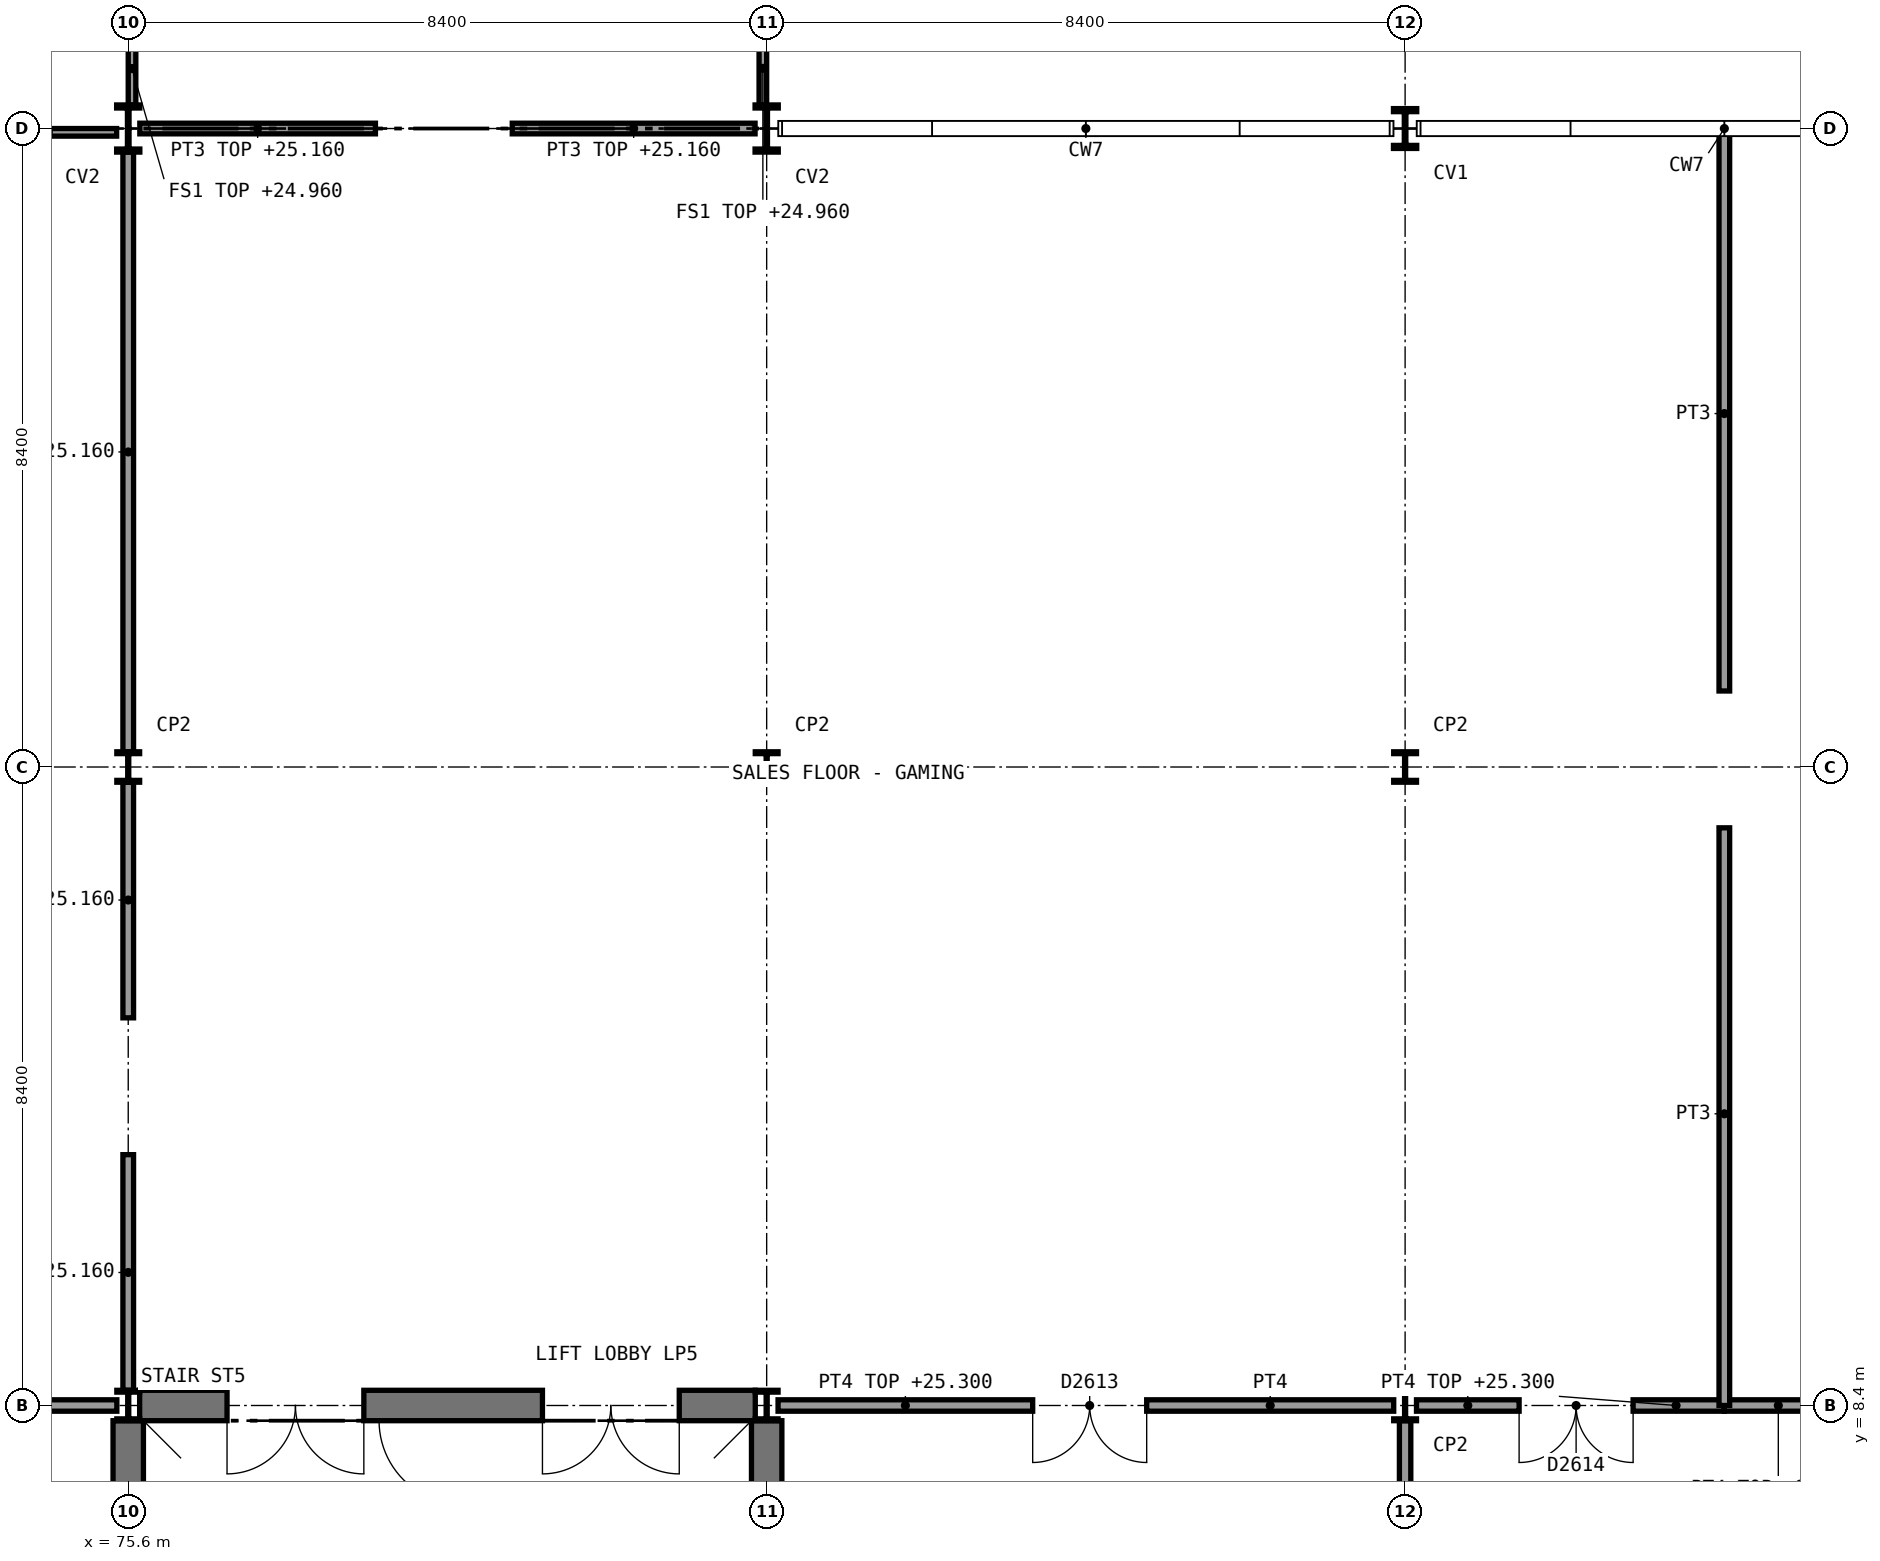
"""IFC4 building model, lengths in metres.
Left out: names, types, materials, properties, quantities, classifications, styles, units other than length and angle.
Written with IfcOpenShell. Run it as: python <this file> out.ifc"""

import sys

from ifc_helpers import new_model, si_unit, direction, frame, frame_2d, origin, origin_2d, place, context, subcontext, project, spatial, rectangle, i_section, extrude, element, fill, save


model = new_model("IFC4")
c1 = context("Model", 3, precision=1e-05, world=origin(), true_north=direction((0.0, 1.0)))
c2 = subcontext(c1, "Body", "Model", "MODEL_VIEW")
j1 = project(units=[si_unit("LENGTHUNIT", "METRE"), si_unit("PLANEANGLEUNIT", "RADIAN")], contexts=[c1])
p1 = place(None, origin())
s1 = spatial("IfcSite", under=j1, at=p1, CompositionType="ELEMENT")
p2 = place(p1, origin())
s2 = spatial("IfcBuilding", under=s1, at=p2, CompositionType="ELEMENT")
p3 = place(p2, frame((0.0, 0.0, 21.0)))
s3 = spatial("IfcBuildingStorey", under=s2, at=p3, CompositionType="ELEMENT", Elevation=21.0)
p4 = place(p3, frame((75.75, 8.4, 0.0), z_axis=(0.0, 0.0, 1.0), x_axis=(1.0, 0.0, 0.0)))
e1 = element("IfcWall", 1, at=p4, inside=s3, PredefinedType="SHEAR", context=c2, shape_type="SweptSolid", body=[
    extrude(rectangle(XDim=8.1, YDim=0.4, at=frame_2d((4.05, 0.0))), origin(), (0.0, 0.0, 1.0), 4.65),
])
p5 = place(p4, frame((1.15, 0.0, 0.0)))
e2 = element("IfcOpeningElement", 2, at=p5, cuts=e1, PredefinedType="OPENING", context=c2, shape_type="SweptSolid", body=[
    extrude(rectangle(XDim=1.8, YDim=2.1, at=frame_2d((0.9, 1.05))), frame((0.0, 0.21, 0.0), z_axis=(0.0, -1.0, 0.0), x_axis=(1.0, 0.0, 0.0)), (0.0, 0.0, 1.0), 0.42),
])
p6 = place(p4, frame((5.3, 0.0, 0.0)))
e3 = element("IfcOpeningElement", 3, at=p6, cuts=e1, PredefinedType="OPENING", context=c2, shape_type="SweptSolid", body=[
    extrude(rectangle(XDim=1.8, YDim=2.1, at=frame_2d((0.9, 1.05))), frame((0.0, 0.21, 0.0), z_axis=(0.0, -1.0, 0.0), x_axis=(1.0, 0.0, 0.0)), (0.0, 0.0, 1.0), 0.42),
])
for number, where, z_axis, x_axis in (
    (4, (75.6, 0.2, 0.0), (0.0, 0.0, 1.0), (0.0, 1.0, 0.0)),
    (5, (84.0, 0.2, 0.0), (0.0, 0.0, 1.0), (0.0, 1.0, 0.0)),
):
    element("IfcWall", number, at=place(p3, frame(where, z_axis=z_axis, x_axis=x_axis)), inside=s3, PredefinedType="SHEAR", context=c2, shape_type="SweptSolid", body=[
        extrude(rectangle(XDim=8.0, YDim=0.4, at=frame_2d((4.0, 0.0))), origin(), (0.0, 0.0, 1.0), 4.65),
    ])
for number, where, z_axis, x_axis in (
    (6, (75.6, 8.4, 0.0), (0.0, 0.0, 1.0), (1.0, 0.0, 0.0)),
    (7, (75.6, 16.8, 0.0), (0.0, 0.0, 1.0), (1.0, 0.0, 0.0)),
):
    element("IfcColumn", number, at=place(p3, frame(where, z_axis=z_axis, x_axis=x_axis)), inside=s3, PredefinedType="COLUMN", context=c2, shape_type="SweptSolid", body=[
        extrude(i_section(OverallWidth=0.3, OverallDepth=0.4, WebThickness=0.013, FlangeThickness=0.024, FilletRadius=0.027, at=origin_2d()), origin(), (0.0, 0.0, 1.0), 4.8),
    ])
p7 = place(p3, frame((75.6, 25.2, 0.0), z_axis=(0.0, 0.0, 1.0), x_axis=(1.0, 0.0, 0.0)))
e8 = element("IfcColumn", 8, at=p7, inside=s3, PredefinedType="COLUMN", context=c2, shape_type="SweptSolid", body=[
    extrude(i_section(OverallWidth=0.305, OverallDepth=0.62, WebThickness=0.021, FlangeThickness=0.04, FilletRadius=0.027, at=origin_2d()), origin(), (0.0, 0.0, 1.0), 4.8),
])
for number, where, z_axis, x_axis in (
    (9, (84.0, 8.4, 0.0), (0.0, 0.0, 1.0), (1.0, 0.0, 0.0)),
    (10, (84.0, 16.8, 0.0), (0.0, 0.0, 1.0), (1.0, 0.0, 0.0)),
):
    element("IfcColumn", number, at=place(p3, frame(where, z_axis=z_axis, x_axis=x_axis)), inside=s3, PredefinedType="COLUMN", context=c2, shape_type="SweptSolid", body=[
        extrude(i_section(OverallWidth=0.3, OverallDepth=0.4, WebThickness=0.013, FlangeThickness=0.024, FilletRadius=0.027, at=origin_2d()), origin(), (0.0, 0.0, 1.0), 4.8),
    ])
p8 = place(p3, frame((84.0, 25.2, 0.0), z_axis=(0.0, 0.0, 1.0), x_axis=(1.0, 0.0, 0.0)))
e11 = element("IfcColumn", 11, at=p8, inside=s3, PredefinedType="COLUMN", context=c2, shape_type="SweptSolid", body=[
    extrude(i_section(OverallWidth=0.305, OverallDepth=0.62, WebThickness=0.021, FlangeThickness=0.04, FilletRadius=0.027, at=origin_2d()), origin(), (0.0, 0.0, 1.0), 4.8),
])
for number, where, z_axis, x_axis in (
    (12, (92.4, 8.4, 0.0), (0.0, 0.0, 1.0), (1.0, 0.0, 0.0)),
    (13, (92.4, 16.8, 0.0), (0.0, 0.0, 1.0), (1.0, 0.0, 0.0)),
):
    element("IfcColumn", number, at=place(p3, frame(where, z_axis=z_axis, x_axis=x_axis)), inside=s3, PredefinedType="COLUMN", context=c2, shape_type="SweptSolid", body=[
        extrude(i_section(OverallWidth=0.3, OverallDepth=0.4, WebThickness=0.013, FlangeThickness=0.024, FilletRadius=0.027, at=origin_2d()), origin(), (0.0, 0.0, 1.0), 4.8),
    ])
p9 = place(p3, frame((92.4, 25.2, 0.0), z_axis=(0.0, 0.0, 1.0), x_axis=(1.0, 0.0, 0.0)))
e14 = element("IfcColumn", 14, at=p9, inside=s3, PredefinedType="COLUMN", context=c2, shape_type="SweptSolid", body=[
    extrude(i_section(OverallWidth=0.306, OverallDepth=0.524, WebThickness=0.021, FlangeThickness=0.04, FilletRadius=0.027, at=origin_2d()), origin(), (0.0, 0.0, 1.0), 4.8),
])
p10 = place(p3, frame((67.35, 8.4, 0.0), z_axis=(0.0, 0.0, 1.0), x_axis=(1.0, 0.0, 0.0)))
e15 = element("IfcWall", 15, at=p10, inside=s3, PredefinedType="SOLIDWALL", context=c2, shape_type="SweptSolid", body=[
    extrude(rectangle(XDim=8.1, YDim=0.15, at=frame_2d((4.05, 0.0))), origin(), (0.0, 0.0, 1.0), 4.3),
])
p11 = place(p10, frame((3.35, 0.0, 0.0)))
e16 = element("IfcOpeningElement", 16, at=p11, cuts=e15, PredefinedType="OPENING", context=c2, shape_type="SweptSolid", body=[
    extrude(rectangle(XDim=1.5, YDim=2.1, at=frame_2d((0.75, 1.05))), frame((0.0, 0.085, 0.0), z_axis=(0.0, -1.0, 0.0), x_axis=(1.0, 0.0, 0.0)), (0.0, 0.0, 1.0), 0.17),
])
p12 = place(p3, frame((92.4, 0.2, 0.0), z_axis=(0.0, 0.0, 1.0), x_axis=(0.0, 1.0, 0.0)))
e17 = element("IfcWall", 17, at=p12, inside=s3, PredefinedType="SOLIDWALL", context=c2, shape_type="SweptSolid", body=[
    extrude(rectangle(XDim=8.0, YDim=0.15, at=frame_2d((4.0, 0.0))), origin(), (0.0, 0.0, 1.0), 4.16),
])
p13 = place(p3, frame((84.15, 8.4, 0.0), z_axis=(0.0, 0.0, 1.0), x_axis=(1.0, 0.0, 0.0)))
e18 = element("IfcWall", 18, at=p13, inside=s3, PredefinedType="SOLIDWALL", context=c2, shape_type="SweptSolid", body=[
    extrude(rectangle(XDim=8.1, YDim=0.15, at=frame_2d((4.05, 0.0))), origin(), (0.0, 0.0, 1.0), 4.3),
])
p14 = place(p13, frame((3.35, 0.0, 0.0)))
e19 = element("IfcOpeningElement", 19, at=p14, cuts=e18, PredefinedType="OPENING", context=c2, shape_type="SweptSolid", body=[
    extrude(rectangle(XDim=1.5, YDim=2.1, at=frame_2d((0.75, 1.05))), frame((0.0, 0.085, 0.0), z_axis=(0.0, -1.0, 0.0), x_axis=(1.0, 0.0, 0.0)), (0.0, 0.0, 1.0), 0.17),
])
p15 = place(p3, frame((92.55, 8.4, 0.0), z_axis=(0.0, 0.0, 1.0), x_axis=(1.0, 0.0, 0.0)))
e20 = element("IfcWall", 20, at=p15, inside=s3, PredefinedType="SOLIDWALL", context=c2, shape_type="SweptSolid", body=[
    extrude(rectangle(XDim=4.05, YDim=0.15, at=frame_2d((2.025, 0.0))), origin(), (0.0, 0.0, 1.0), 4.3),
])
p16 = place(p15, frame((1.35, 0.0, 0.0)))
e21 = element("IfcOpeningElement", 21, at=p16, cuts=e20, PredefinedType="OPENING", context=c2, shape_type="SweptSolid", body=[
    extrude(rectangle(XDim=1.5, YDim=2.1, at=frame_2d((0.75, 1.05))), frame((0.0, 0.085, 0.0), z_axis=(0.0, -1.0, 0.0), x_axis=(1.0, 0.0, 0.0)), (0.0, 0.0, 1.0), 0.17),
])
p17 = place(p3, frame((96.6, 8.4, 0.0), z_axis=(0.0, 0.0, 1.0), x_axis=(1.0, 0.0, 0.0)))
e22 = element("IfcWall", 22, at=p17, inside=s3, PredefinedType="SOLIDWALL", context=c2, shape_type="SweptSolid", body=[
    extrude(rectangle(XDim=4.05, YDim=0.15, at=frame_2d((2.025, 0.0))), origin(), (0.0, 0.0, 1.0), 4.3),
])
p18 = place(p17, frame((1.35, 0.0, 0.0)))
e23 = element("IfcOpeningElement", 23, at=p18, cuts=e22, PredefinedType="OPENING", context=c2, shape_type="SweptSolid", body=[
    extrude(rectangle(XDim=1.5, YDim=2.1, at=frame_2d((0.75, 1.05))), frame((0.0, 0.085, 0.0), z_axis=(0.0, -1.0, 0.0), x_axis=(1.0, 0.0, 0.0)), (0.0, 0.0, 1.0), 0.17),
])
for number, where, z_axis, x_axis in (
    (24, (75.6, 8.6, 0.0), (0.0, 0.0, 1.0), (0.0, 1.0, 0.0)),
    (25, (75.6, 13.5, 0.0), (0.0, 0.0, 1.0), (0.0, 1.0, 0.0)),
):
    element("IfcWall", number, at=place(p3, frame(where, z_axis=z_axis, x_axis=x_axis)), inside=s3, PredefinedType="PARTITIONING", context=c2, shape_type="SweptSolid", body=[
        extrude(rectangle(XDim=3.1, YDim=0.14, at=frame_2d((1.55, 0.0))), origin(), (0.0, 0.0, 1.0), 4.16),
    ])
p19 = place(p3, frame((75.6, 17.0, 0.0), z_axis=(0.0, 0.0, 1.0), x_axis=(0.0, 1.0, 0.0)))
e26 = element("IfcWall", 26, at=p19, inside=s3, PredefinedType="PARTITIONING", context=c2, shape_type="SweptSolid", body=[
    extrude(rectangle(XDim=7.89, YDim=0.14, at=frame_2d((3.945, 0.0))), origin(), (0.0, 0.0, 1.0), 4.16),
])
p20 = place(p3, frame((96.6, 8.4, 0.0), z_axis=(0.0, 0.0, 1.0), x_axis=(0.0, 1.0, 0.0)))
e27 = element("IfcWall", 27, at=p20, inside=s3, PredefinedType="PARTITIONING", context=c2, shape_type="SweptSolid", body=[
    extrude(rectangle(XDim=7.6, YDim=0.14, at=frame_2d((3.8, 0.0))), origin(), (0.0, 0.0, 1.0), 4.65),
])
p21 = place(p3, frame((96.6, 17.8, 0.0), z_axis=(0.0, 0.0, 1.0), x_axis=(0.0, 1.0, 0.0)))
e28 = element("IfcWall", 28, at=p21, inside=s3, PredefinedType="PARTITIONING", context=c2, shape_type="SweptSolid", body=[
    extrude(rectangle(XDim=7.4, YDim=0.14, at=frame_2d((3.7, 0.0))), origin(), (0.0, 0.0, 1.0), 4.65),
])
p22 = place(p3, frame((75.753, 25.2, 0.0), z_axis=(0.0, 0.0, 1.0), x_axis=(1.0, 0.0, 0.0)))
e29 = element("IfcWall", 29, at=p22, inside=s3, PredefinedType="PARTITIONING", context=c2, shape_type="SweptSolid", body=[
    extrude(rectangle(XDim=3.1, YDim=0.14, at=frame_2d((1.55, 0.0))), origin(), (0.0, 0.0, 1.0), 4.16),
])
p23 = place(p3, frame((80.653, 25.2, 0.0), z_axis=(0.0, 0.0, 1.0), x_axis=(1.0, 0.0, 0.0)))
e30 = element("IfcWall", 30, at=p23, inside=s3, PredefinedType="PARTITIONING", context=c2, shape_type="SweptSolid", body=[
    extrude(rectangle(XDim=3.195, YDim=0.14, at=frame_2d((1.597, 0.0))), origin(), (0.0, 0.0, 1.0), 4.16),
])
p24 = place(p3, frame((80.0, 0.2, 0.0), z_axis=(0.0, 0.0, 1.0), x_axis=(0.0, 1.0, 0.0)))
e31 = element("IfcWall", 31, at=p24, inside=s3, PredefinedType="SHEAR", context=c2, shape_type="SweptSolid", body=[
    extrude(rectangle(XDim=8.0, YDim=0.2, at=frame_2d((4.0, 0.0))), origin(), (0.0, 0.0, 1.0), 4.65),
])
p25 = place(p24, frame((6.9, 0.0, 0.0)))
e32 = element("IfcOpeningElement", 32, at=p25, cuts=e31, PredefinedType="OPENING", context=c2, shape_type="SweptSolid", body=[
    extrude(rectangle(XDim=1.11, YDim=2.1, at=frame_2d((0.555, 1.05))), frame((0.0, 0.11, 0.0), z_axis=(0.0, -1.0, 0.0), x_axis=(1.0, 0.0, 0.0)), (0.0, 0.0, 1.0), 0.22),
])
p26 = place(p3, frame((73.65, 25.15, 0.0), z_axis=(0.0, 0.0, 1.0), x_axis=(1.0, 0.0, 0.0)))
e33 = element("IfcWall", 33, at=p26, inside=s3, PredefinedType="PARTITIONING", context=c2, shape_type="SweptSolid", body=[
    extrude(rectangle(XDim=1.798, YDim=0.1, at=frame_2d((0.899, 0.0))), origin(), (0.0, 0.0, 1.0), 4.11),
])
p27 = place(p3, frame((75.65, 25.51, 0.0), z_axis=(0.0, 0.0, 1.0), x_axis=(0.0, 1.0, 0.0)))
e34 = element("IfcWall", 34, at=p27, inside=s3, PredefinedType="PARTITIONING", context=c2, shape_type="SweptSolid", body=[
    extrude(rectangle(XDim=11.98, YDim=0.1, at=frame_2d((5.99, 0.0))), origin(), (0.0, 0.0, 1.0), 3.96),
])
p28 = place(p3, frame((83.95, 25.51, 0.0), z_axis=(0.0, 0.0, 1.0), x_axis=(0.0, 1.0, 0.0)))
e35 = element("IfcWall", 35, at=p28, inside=s3, PredefinedType="PARTITIONING", context=c2, shape_type="SweptSolid", body=[
    extrude(rectangle(XDim=12.051, YDim=0.1, at=frame_2d((6.025, 0.0))), origin(), (0.0, 0.0, 1.0), 3.96),
])
p29 = place(p14, frame((1.5, 0.0, 0.0), z_axis=(0.0, 0.0, 1.0), x_axis=(-1.0, 0.0, 0.0)))
e36 = element("IfcDoor", 36, at=p29, inside=s3, OperationType="DOUBLE_DOOR_SINGLE_SWING", PredefinedType="DOOR", context=c2, shape_type="SweptSolid", body=[
    extrude(rectangle(XDim=1.5, YDim=2.1, at=frame_2d((0.75, 1.05))), frame((0.0, 0.025, 0.0), z_axis=(0.0, -1.0, 0.0), x_axis=(1.0, 0.0, 0.0)), (0.0, 0.0, 1.0), 0.05),
])
fill(e19, e36)
p30 = place(p16, frame((1.5, 0.0, 0.0), z_axis=(0.0, 0.0, 1.0), x_axis=(-1.0, 0.0, 0.0)))
e37 = element("IfcDoor", 37, at=p30, inside=s3, OperationType="DOUBLE_DOOR_SINGLE_SWING", PredefinedType="DOOR", context=c2, shape_type="SweptSolid", body=[
    extrude(rectangle(XDim=1.5, YDim=2.1, at=frame_2d((0.75, 1.05))), frame((0.0, 0.025, 0.0), z_axis=(0.0, -1.0, 0.0), x_axis=(1.0, 0.0, 0.0)), (0.0, 0.0, 1.0), 0.05),
])
fill(e21, e37)
p31 = place(p25, origin())
e38 = element("IfcDoor", 38, at=p31, inside=s3, OperationType="SINGLE_SWING_RIGHT", PredefinedType="DOOR", context=c2, shape_type="SweptSolid", body=[
    extrude(rectangle(XDim=1.1, YDim=2.1, at=frame_2d((0.55, 1.05))), frame((0.0, 0.025, 0.0), z_axis=(0.0, -1.0, 0.0), x_axis=(1.0, 0.0, 0.0)), (0.0, 0.0, 1.0), 0.05),
])
fill(e32, e38)
p32 = place(p5, frame((1.8, 0.0, 0.0), z_axis=(0.0, 0.0, 1.0), x_axis=(-1.0, 0.0, 0.0)))
e39 = element("IfcDoor", 39, at=p32, inside=s3, OperationType="DOUBLE_DOOR_SINGLE_SWING", PredefinedType="DOOR", context=c2, shape_type="SweptSolid", body=[
    extrude(rectangle(XDim=1.8, YDim=2.1, at=frame_2d((0.9, 1.05))), frame((0.0, 0.025, 0.0), z_axis=(0.0, -1.0, 0.0), x_axis=(1.0, 0.0, 0.0)), (0.0, 0.0, 1.0), 0.05),
])
fill(e2, e39)
p33 = place(p6, frame((1.8, 0.0, 0.0), z_axis=(0.0, 0.0, 1.0), x_axis=(-1.0, 0.0, 0.0)))
e40 = element("IfcDoor", 40, at=p33, inside=s3, OperationType="DOUBLE_DOOR_SINGLE_SWING", PredefinedType="DOOR", context=c2, shape_type="SweptSolid", body=[
    extrude(rectangle(XDim=1.8, YDim=2.1, at=frame_2d((0.9, 1.05))), frame((0.0, 0.025, 0.0), z_axis=(0.0, -1.0, 0.0), x_axis=(1.0, 0.0, 0.0)), (0.0, 0.0, 1.0), 0.05),
])
fill(e3, e40)
save(model, sys.argv[1])
